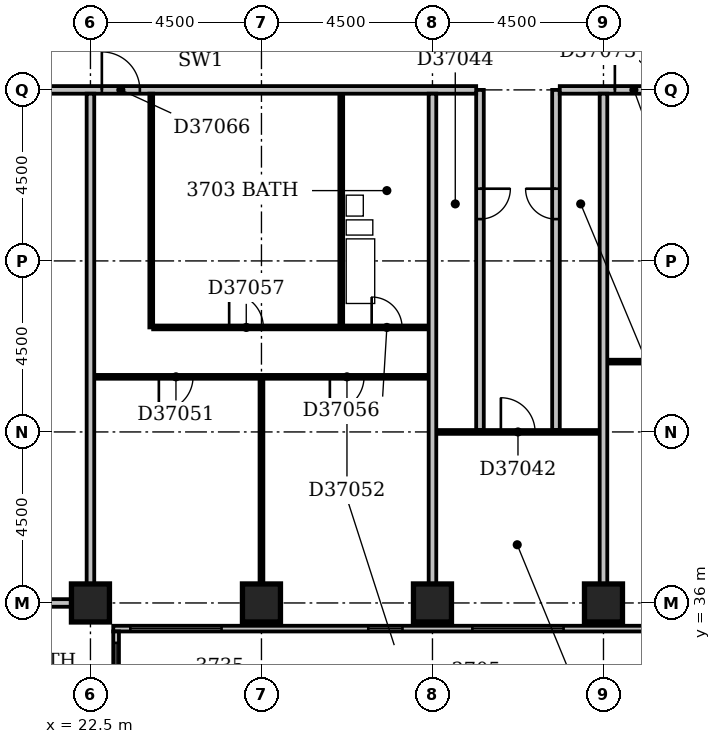
"""IFC4 building model, lengths in metres.
Left out: names, types, materials, properties, quantities, classifications, styles, units other than length and angle.
Written with IfcOpenShell. Run it as: python <this file> out.ifc"""

import sys

from ifc_helpers import new_model, si_unit, direction, frame, frame_2d, origin, origin_2d, place, context, subcontext, project, spatial, rectangle, extrude, element, fill, save


model = new_model("IFC4")
c1 = context("Model", 3, precision=1e-05, world=origin(), true_north=direction((0.0, 1.0)))
c2 = subcontext(c1, "Body", "Model", "MODEL_VIEW")
j1 = project(units=[si_unit("LENGTHUNIT", "METRE"), si_unit("PLANEANGLEUNIT", "RADIAN")], contexts=[c1])
p1 = place(None, origin())
s1 = spatial("IfcSite", under=j1, at=p1, CompositionType="ELEMENT")
p2 = place(p1, origin())
s2 = spatial("IfcBuilding", under=s1, at=p2, CompositionType="ELEMENT")
p3 = place(p2, frame((0.0, 0.0, 148.4)))
s3 = spatial("IfcBuildingStorey", under=s2, at=p3, CompositionType="ELEMENT", Elevation=148.4)
for number, where, z_axis, x_axis in (
    (1, (22.5, 36.0, -0.3), (0.0, 0.0, 1.0), (1.0, 0.0, 0.0)),
    (2, (27.0, 36.0, -0.3), (0.0, 0.0, 1.0), (1.0, 0.0, 0.0)),
    (3, (31.5, 36.0, -0.3), (0.0, 0.0, 1.0), (1.0, 0.0, 0.0)),
    (4, (36.0, 36.0, -0.3), (0.0, 0.0, 1.0), (1.0, 0.0, 0.0)),
):
    element("IfcColumn", number, at=place(p3, frame(where, z_axis=z_axis, x_axis=x_axis)), inside=s3, PredefinedType="COLUMN", context=c2, shape_type="SweptSolid", body=[
        extrude(rectangle(XDim=1.0, YDim=1.0, at=origin_2d()), origin(), (0.0, 0.0, 1.0), 3.6),
    ])
p4 = place(p3, frame((23.175, 17.4, 0.0), z_axis=(0.0, 0.0, 1.0), x_axis=(0.0, 1.0, 0.0)))
e5 = element("IfcWall", 5, at=p4, inside=s3, PredefinedType="STANDARD", context=c2, shape_type="SweptSolid", body=[
    extrude(rectangle(XDim=17.85, YDim=0.15, at=frame_2d((8.925, 0.0))), origin(), (0.0, 0.0, 1.0), 2.7),
])
p5 = place(p4, frame((1.65, 0.0, 0.6)))
e6 = element("IfcOpeningElement", 6, at=p5, cuts=e5, PredefinedType="OPENING", context=c2, shape_type="SweptSolid", body=[
    extrude(rectangle(XDim=2.4, YDim=1.8, at=frame_2d((1.2, 0.9))), frame((0.0, 0.087, 0.0), z_axis=(0.0, -1.0, 0.0), x_axis=(1.0, 0.0, 0.0)), (0.0, 0.0, 1.0), 0.174),
])
p6 = place(p4, frame((5.848, 0.0, 0.6)))
e7 = element("IfcOpeningElement", 7, at=p6, cuts=e5, PredefinedType="OPENING", context=c2, shape_type="SweptSolid", body=[
    extrude(rectangle(XDim=0.9, YDim=1.8, at=frame_2d((0.45, 0.9))), frame((0.0, 0.087, 0.0), z_axis=(0.0, -1.0, 0.0), x_axis=(1.0, 0.0, 0.0)), (0.0, 0.0, 1.0), 0.174),
])
p7 = place(p4, frame((10.65, 0.0, 0.6)))
e8 = element("IfcOpeningElement", 8, at=p7, cuts=e5, PredefinedType="OPENING", context=c2, shape_type="SweptSolid", body=[
    extrude(rectangle(XDim=2.4, YDim=1.8, at=frame_2d((1.2, 0.9))), frame((0.0, 0.087, 0.0), z_axis=(0.0, -1.0, 0.0), x_axis=(1.0, 0.0, 0.0)), (0.0, 0.0, 1.0), 0.174),
])
p8 = place(p4, frame((15.15, 0.0, 0.6)))
e9 = element("IfcOpeningElement", 9, at=p8, cuts=e5, PredefinedType="OPENING", context=c2, shape_type="SweptSolid", body=[
    extrude(rectangle(XDim=2.4, YDim=1.8, at=frame_2d((1.2, 0.9))), frame((0.0, 0.087, 0.0), z_axis=(0.0, -1.0, 0.0), x_axis=(1.0, 0.0, 0.0)), (0.0, 0.0, 1.0), 0.174),
])
p9 = place(p3, frame((23.1, 35.325, 0.0), z_axis=(0.0, 0.0, 1.0), x_axis=(1.0, 0.0, 0.0)))
e10 = element("IfcWall", 10, at=p9, inside=s3, PredefinedType="STANDARD", context=c2, shape_type="SweptSolid", body=[
    extrude(rectangle(XDim=45.15, YDim=0.15, at=frame_2d((22.575, 0.0))), origin(), (0.0, 0.0, 1.0), 2.7),
])
p10 = place(p9, frame((0.45, 0.0, 0.6)))
e11 = element("IfcOpeningElement", 11, at=p10, cuts=e10, PredefinedType="OPENING", context=c2, shape_type="SweptSolid", body=[
    extrude(rectangle(XDim=2.4, YDim=1.8, at=frame_2d((1.2, 0.9))), frame((0.0, 0.087, 0.0), z_axis=(0.0, -1.0, 0.0), x_axis=(1.0, 0.0, 0.0)), (0.0, 0.0, 1.0), 0.174),
])
p11 = place(p9, frame((6.711, 0.0, 0.6)))
e12 = element("IfcOpeningElement", 12, at=p11, cuts=e10, PredefinedType="OPENING", context=c2, shape_type="SweptSolid", body=[
    extrude(rectangle(XDim=0.9, YDim=1.8, at=frame_2d((0.45, 0.9))), frame((0.0, 0.087, 0.0), z_axis=(0.0, -1.0, 0.0), x_axis=(1.0, 0.0, 0.0)), (0.0, 0.0, 1.0), 0.174),
])
p12 = place(p9, frame((9.45, 0.0, 0.6)))
e13 = element("IfcOpeningElement", 13, at=p12, cuts=e10, PredefinedType="OPENING", context=c2, shape_type="SweptSolid", body=[
    extrude(rectangle(XDim=2.4, YDim=1.8, at=frame_2d((1.2, 0.9))), frame((0.0, 0.087, 0.0), z_axis=(0.0, -1.0, 0.0), x_axis=(1.0, 0.0, 0.0)), (0.0, 0.0, 1.0), 0.174),
])
p13 = place(p9, frame((13.95, 0.0, 0.6)))
e14 = element("IfcOpeningElement", 14, at=p13, cuts=e10, PredefinedType="OPENING", context=c2, shape_type="SweptSolid", body=[
    extrude(rectangle(XDim=2.4, YDim=1.8, at=frame_2d((1.2, 0.9))), frame((0.0, 0.087, 0.0), z_axis=(0.0, -1.0, 0.0), x_axis=(1.0, 0.0, 0.0)), (0.0, 0.0, 1.0), 0.174),
])
p14 = place(p9, frame((18.153, 0.0, 0.6)))
e15 = element("IfcOpeningElement", 15, at=p14, cuts=e10, PredefinedType="OPENING", context=c2, shape_type="SweptSolid", body=[
    extrude(rectangle(XDim=1.5, YDim=1.8, at=frame_2d((0.75, 0.9))), frame((0.0, 0.087, 0.0), z_axis=(0.0, -1.0, 0.0), x_axis=(1.0, 0.0, 0.0)), (0.0, 0.0, 1.0), 0.174),
])
p15 = place(p9, frame((22.95, 0.0, 0.6)))
e16 = element("IfcOpeningElement", 16, at=p15, cuts=e10, PredefinedType="OPENING", context=c2, shape_type="SweptSolid", body=[
    extrude(rectangle(XDim=2.4, YDim=1.8, at=frame_2d((1.2, 0.9))), frame((0.0, 0.087, 0.0), z_axis=(0.0, -1.0, 0.0), x_axis=(1.0, 0.0, 0.0)), (0.0, 0.0, 1.0), 0.174),
])
p16 = place(p9, frame((27.45, 0.0, 0.6)))
e17 = element("IfcOpeningElement", 17, at=p16, cuts=e10, PredefinedType="OPENING", context=c2, shape_type="SweptSolid", body=[
    extrude(rectangle(XDim=2.4, YDim=1.8, at=frame_2d((1.2, 0.9))), frame((0.0, 0.087, 0.0), z_axis=(0.0, -1.0, 0.0), x_axis=(1.0, 0.0, 0.0)), (0.0, 0.0, 1.0), 0.174),
])
p17 = place(p9, frame((31.689, 0.0, 0.6)))
e18 = element("IfcOpeningElement", 18, at=p17, cuts=e10, PredefinedType="OPENING", context=c2, shape_type="SweptSolid", body=[
    extrude(rectangle(XDim=1.2, YDim=1.8, at=frame_2d((0.6, 0.9))), frame((0.0, 0.087, 0.0), z_axis=(0.0, -1.0, 0.0), x_axis=(1.0, 0.0, 0.0)), (0.0, 0.0, 1.0), 0.174),
])
p18 = place(p9, frame((36.45, 0.0, 0.6)))
e19 = element("IfcOpeningElement", 19, at=p18, cuts=e10, PredefinedType="OPENING", context=c2, shape_type="SweptSolid", body=[
    extrude(rectangle(XDim=2.4, YDim=1.8, at=frame_2d((1.2, 0.9))), frame((0.0, 0.087, 0.0), z_axis=(0.0, -1.0, 0.0), x_axis=(1.0, 0.0, 0.0)), (0.0, 0.0, 1.0), 0.174),
])
p19 = place(p9, frame((40.95, 0.0, 0.6)))
e20 = element("IfcOpeningElement", 20, at=p19, cuts=e10, PredefinedType="OPENING", context=c2, shape_type="SweptSolid", body=[
    extrude(rectangle(XDim=2.4, YDim=1.8, at=frame_2d((1.2, 0.9))), frame((0.0, 0.087, 0.0), z_axis=(0.0, -1.0, 0.0), x_axis=(1.0, 0.0, 0.0)), (0.0, 0.0, 1.0), 0.174),
])
for number, where, z_axis, x_axis in (
    (21, (9.1, 36.0, 0.0), (0.0, 0.0, 1.0), (1.0, 0.0, 0.0)),
    (22, (22.5, 36.5, 0.0), (0.0, 0.0, 1.0), (0.0, 1.0, 0.0)),
):
    element("IfcWall", number, at=place(p3, frame(where, z_axis=z_axis, x_axis=x_axis)), inside=s3, PredefinedType="PARTITIONING", context=c2, shape_type="SweptSolid", body=[
        extrude(rectangle(XDim=12.9, YDim=0.2, at=frame_2d((6.45, 0.0))), origin(), (0.0, 0.0, 1.0), 3.3),
    ])
p20 = place(p3, frame((27.0, 36.5, 0.0), z_axis=(0.0, 0.0, 1.0), x_axis=(0.0, 1.0, 0.0)))
e23 = element("IfcWall", 23, at=p20, inside=s3, PredefinedType="PARTITIONING", context=c2, shape_type="SweptSolid", body=[
    extrude(rectangle(XDim=5.4, YDim=0.1, at=frame_2d((2.7, 0.0))), origin(), (0.0, 0.0, 1.0), 2.6),
])
p21 = place(p3, frame((31.5, 36.5, 0.0), z_axis=(0.0, 0.0, 1.0), x_axis=(0.0, 1.0, 0.0)))
e24 = element("IfcWall", 24, at=p21, inside=s3, PredefinedType="PARTITIONING", context=c2, shape_type="SweptSolid", body=[
    extrude(rectangle(XDim=12.9, YDim=0.2, at=frame_2d((6.45, 0.0))), origin(), (0.0, 0.0, 1.0), 3.3),
])
p22 = place(p3, frame((36.0, 36.5, 0.0), z_axis=(0.0, 0.0, 1.0), x_axis=(0.0, 1.0, 0.0)))
e25 = element("IfcWall", 25, at=p22, inside=s3, PredefinedType="PARTITIONING", context=c2, shape_type="SweptSolid", body=[
    extrude(rectangle(XDim=12.9, YDim=0.2, at=frame_2d((6.45, 0.0))), origin(), (0.0, 0.0, 1.0), 2.4),
])
p23 = place(p3, frame((31.6, 40.5, 0.0), z_axis=(0.0, 0.0, 1.0), x_axis=(1.0, 0.0, 0.0)))
e26 = element("IfcWall", 26, at=p23, inside=s3, PredefinedType="PARTITIONING", context=c2, shape_type="SweptSolid", body=[
    extrude(rectangle(XDim=4.3, YDim=0.1, at=frame_2d((2.15, 0.0))), origin(), (0.0, 0.0, 1.0), 3.3),
])
p24 = place(p23, frame((1.7, 0.0, 0.0)))
e27 = element("IfcOpeningElement", 27, at=p24, cuts=e26, PredefinedType="OPENING", context=c2, shape_type="SweptSolid", body=[
    extrude(rectangle(XDim=0.9, YDim=2.1, at=frame_2d((0.45, 1.05))), frame((0.0, 0.062, 0.0), z_axis=(0.0, -1.0, 0.0), x_axis=(1.0, 0.0, 0.0)), (0.0, 0.0, 1.0), 0.124),
])
p25 = place(p3, frame((32.75, 40.55, 0.0), z_axis=(0.0, 0.0, 1.0), x_axis=(0.0, 1.0, 0.0)))
e28 = element("IfcWall", 28, at=p25, inside=s3, PredefinedType="PARTITIONING", context=c2, shape_type="SweptSolid", body=[
    extrude(rectangle(XDim=8.95, YDim=0.2, at=frame_2d((4.475, 0.0))), origin(), (0.0, 0.0, 1.0), 3.3),
])
p26 = place(p25, frame((5.55, 0.0, 0.0)))
e29 = element("IfcOpeningElement", 29, at=p26, cuts=e28, PredefinedType="OPENING", context=c2, shape_type="SweptSolid", body=[
    extrude(rectangle(XDim=0.8, YDim=2.1, at=frame_2d((0.4, 1.05))), frame((0.0, 0.112, 0.0), z_axis=(0.0, -1.0, 0.0), x_axis=(1.0, 0.0, 0.0)), (0.0, 0.0, 1.0), 0.224),
])
p27 = place(p3, frame((34.75, 40.55, 0.0), z_axis=(0.0, 0.0, 1.0), x_axis=(0.0, 1.0, 0.0)))
e30 = element("IfcWall", 30, at=p27, inside=s3, PredefinedType="PARTITIONING", context=c2, shape_type="SweptSolid", body=[
    extrude(rectangle(XDim=8.95, YDim=0.2, at=frame_2d((4.475, 0.0))), origin(), (0.0, 0.0, 1.0), 3.3),
])
p28 = place(p27, frame((5.55, 0.0, 0.0)))
e31 = element("IfcOpeningElement", 31, at=p28, cuts=e30, PredefinedType="OPENING", context=c2, shape_type="SweptSolid", body=[
    extrude(rectangle(XDim=0.8, YDim=2.1, at=frame_2d((0.4, 1.05))), frame((0.0, 0.112, 0.0), z_axis=(0.0, -1.0, 0.0), x_axis=(1.0, 0.0, 0.0)), (0.0, 0.0, 1.0), 0.224),
])
p29 = place(p3, frame((22.6, 41.95, 0.0), z_axis=(0.0, 0.0, 1.0), x_axis=(1.0, 0.0, 0.0)))
e32 = element("IfcWall", 32, at=p29, inside=s3, PredefinedType="PARTITIONING", context=c2, shape_type="SweptSolid", body=[
    extrude(rectangle(XDim=8.8, YDim=0.1, at=frame_2d((4.4, 0.0))), origin(), (0.0, 0.0, 1.0), 3.3),
])
p30 = place(p29, frame((1.7, 0.0, 0.0)))
e33 = element("IfcOpeningElement", 33, at=p30, cuts=e32, PredefinedType="OPENING", context=c2, shape_type="SweptSolid", body=[
    extrude(rectangle(XDim=0.9, YDim=2.1, at=frame_2d((0.45, 1.05))), frame((0.0, 0.062, 0.0), z_axis=(0.0, -1.0, 0.0), x_axis=(1.0, 0.0, 0.0)), (0.0, 0.0, 1.0), 0.124),
])
p31 = place(p29, frame((6.2, 0.0, 0.0)))
e34 = element("IfcOpeningElement", 34, at=p31, cuts=e32, PredefinedType="OPENING", context=c2, shape_type="SweptSolid", body=[
    extrude(rectangle(XDim=0.9, YDim=2.1, at=frame_2d((0.45, 1.05))), frame((0.0, 0.062, 0.0), z_axis=(0.0, -1.0, 0.0), x_axis=(1.0, 0.0, 0.0)), (0.0, 0.0, 1.0), 0.124),
])
p32 = place(p3, frame((36.1, 42.35, 0.0), z_axis=(0.0, 0.0, 1.0), x_axis=(1.0, 0.0, 0.0)))
e35 = element("IfcWall", 35, at=p32, inside=s3, PredefinedType="PARTITIONING", context=c2, shape_type="SweptSolid", body=[
    extrude(rectangle(XDim=13.3, YDim=0.1, at=frame_2d((6.65, 0.0))), origin(), (0.0, 0.0, 1.0), 3.3),
])
p33 = place(p32, frame((1.7, 0.0, 0.0)))
e36 = element("IfcOpeningElement", 36, at=p33, cuts=e35, PredefinedType="OPENING", context=c2, shape_type="SweptSolid", body=[
    extrude(rectangle(XDim=0.9, YDim=2.1, at=frame_2d((0.45, 1.05))), frame((0.0, 0.062, 0.0), z_axis=(0.0, -1.0, 0.0), x_axis=(1.0, 0.0, 0.0)), (0.0, 0.0, 1.0), 0.124),
])
p34 = place(p32, frame((6.2, 0.0, 0.0)))
e37 = element("IfcOpeningElement", 37, at=p34, cuts=e35, PredefinedType="OPENING", context=c2, shape_type="SweptSolid", body=[
    extrude(rectangle(XDim=0.9, YDim=2.1, at=frame_2d((0.45, 1.05))), frame((0.0, 0.062, 0.0), z_axis=(0.0, -1.0, 0.0), x_axis=(1.0, 0.0, 0.0)), (0.0, 0.0, 1.0), 0.124),
])
p35 = place(p32, frame((10.7, 0.0, 0.0)))
e38 = element("IfcOpeningElement", 38, at=p35, cuts=e35, PredefinedType="OPENING", context=c2, shape_type="SweptSolid", body=[
    extrude(rectangle(XDim=0.9, YDim=2.1, at=frame_2d((0.45, 1.05))), frame((0.0, 0.062, 0.0), z_axis=(0.0, -1.0, 0.0), x_axis=(1.0, 0.0, 0.0)), (0.0, 0.0, 1.0), 0.124),
])
p36 = place(p3, frame((24.1, 43.25, 0.0), z_axis=(0.0, 0.0, 1.0), x_axis=(0.0, 1.0, 0.0)))
e39 = element("IfcWall", 39, at=p36, inside=s3, PredefinedType="PARTITIONING", context=c2, shape_type="SweptSolid", body=[
    extrude(rectangle(XDim=6.15, YDim=0.1, at=frame_2d((3.075, 0.0))), origin(), (0.0, 0.0, 1.0), 3.3),
])
p37 = place(p3, frame((24.15, 43.25, 0.0), z_axis=(0.0, 0.0, 1.0), x_axis=(1.0, 0.0, 0.0)))
e40 = element("IfcWall", 40, at=p37, inside=s3, PredefinedType="PARTITIONING", context=c2, shape_type="SweptSolid", body=[
    extrude(rectangle(XDim=7.25, YDim=0.1, at=frame_2d((3.625, 0.0))), origin(), (0.0, 0.0, 1.0), 3.3),
])
p38 = place(p37, frame((5.75, 0.0, 0.0)))
e41 = element("IfcOpeningElement", 41, at=p38, cuts=e40, PredefinedType="OPENING", context=c2, shape_type="SweptSolid", body=[
    extrude(rectangle(XDim=0.8, YDim=2.1, at=frame_2d((0.4, 1.05))), frame((0.0, 0.062, 0.0), z_axis=(0.0, -1.0, 0.0), x_axis=(1.0, 0.0, 0.0)), (0.0, 0.0, 1.0), 0.124),
])
p39 = place(p37, frame((2.0, 0.0, 0.0)))
e42 = element("IfcOpeningElement", 42, at=p39, cuts=e40, PredefinedType="OPENING", context=c2, shape_type="SweptSolid", body=[
    extrude(rectangle(XDim=0.9, YDim=2.1, at=frame_2d((0.45, 1.05))), frame((0.0, 0.062, 0.0), z_axis=(0.0, -1.0, 0.0), x_axis=(1.0, 0.0, 0.0)), (0.0, 0.0, 1.0), 0.124),
])
p40 = place(p3, frame((29.1, 43.3, 0.0), z_axis=(0.0, 0.0, 1.0), x_axis=(0.0, 1.0, 0.0)))
e43 = element("IfcWall", 43, at=p40, inside=s3, PredefinedType="PLUMBINGWALL", context=c2, shape_type="SweptSolid", body=[
    extrude(rectangle(XDim=6.1, YDim=0.1, at=frame_2d((3.05, 0.0))), origin(), (0.0, 0.0, 1.0), 3.3),
])
p41 = place(p3, frame((9.1, 49.5, 0.0), z_axis=(0.0, 0.0, 1.0), x_axis=(1.0, 0.0, 0.0)))
e44 = element("IfcWall", 44, at=p41, inside=s3, PredefinedType="PARTITIONING", context=c2, shape_type="SweptSolid", body=[
    extrude(rectangle(XDim=23.55, YDim=0.2, at=frame_2d((11.775, 0.0))), origin(), (0.0, 0.0, 1.0), 3.3),
])
p42 = place(p41, frame((13.7, 0.0, 0.0)))
e45 = element("IfcOpeningElement", 45, at=p42, cuts=e44, PredefinedType="OPENING", context=c2, shape_type="SweptSolid", body=[
    extrude(rectangle(XDim=1.0, YDim=2.1, at=frame_2d((0.5, 1.05))), frame((0.0, 0.112, 0.0), z_axis=(0.0, -1.0, 0.0), x_axis=(1.0, 0.0, 0.0)), (0.0, 0.0, 1.0), 0.224),
])
p43 = place(p41, frame((10.65, 0.0, 0.0)))
e46 = element("IfcOpeningElement", 46, at=p43, cuts=e44, PredefinedType="OPENING", context=c2, shape_type="SweptSolid", body=[
    extrude(rectangle(XDim=0.9, YDim=2.1, at=frame_2d((0.45, 1.05))), frame((0.0, 0.112, 0.0), z_axis=(0.0, -1.0, 0.0), x_axis=(1.0, 0.0, 0.0)), (0.0, 0.0, 1.0), 0.224),
])
p44 = place(p3, frame((34.85, 49.5, 0.0), z_axis=(0.0, 0.0, 1.0), x_axis=(1.0, 0.0, 0.0)))
e47 = element("IfcWall", 47, at=p44, inside=s3, PredefinedType="PARTITIONING", context=c2, shape_type="SweptSolid", body=[
    extrude(rectangle(XDim=15.8, YDim=0.2, at=frame_2d((7.9, 0.0))), origin(), (0.0, 0.0, 1.0), 3.3),
])
p45 = place(p44, frame((1.45, 0.0, 0.0)))
e48 = element("IfcOpeningElement", 48, at=p45, cuts=e47, PredefinedType="OPENING", context=c2, shape_type="SweptSolid", body=[
    extrude(rectangle(XDim=1.0, YDim=2.1, at=frame_2d((0.5, 1.05))), frame((0.0, 0.112, 0.0), z_axis=(0.0, -1.0, 0.0), x_axis=(1.0, 0.0, 0.0)), (0.0, 0.0, 1.0), 0.224),
])
p46 = place(p8, origin())
e49 = element("IfcWindow", 49, at=p46, inside=s3, PartitioningType="SINGLE_PANEL", PredefinedType="WINDOW", context=c2, shape_type="SweptSolid", body=[
    extrude(rectangle(XDim=2.4, YDim=1.8, at=frame_2d((1.2, 0.9))), frame((0.0, 0.03, 0.0), z_axis=(0.0, -1.0, 0.0), x_axis=(1.0, 0.0, 0.0)), (0.0, 0.0, 1.0), 0.06),
])
fill(e9, e49)
p47 = place(p10, origin())
e50 = element("IfcWindow", 50, at=p47, inside=s3, PartitioningType="SINGLE_PANEL", PredefinedType="WINDOW", context=c2, shape_type="SweptSolid", body=[
    extrude(rectangle(XDim=2.4, YDim=1.8, at=frame_2d((1.2, 0.9))), frame((0.0, 0.03, 0.0), z_axis=(0.0, -1.0, 0.0), x_axis=(1.0, 0.0, 0.0)), (0.0, 0.0, 1.0), 0.06),
])
fill(e11, e50)
p48 = place(p11, origin())
e51 = element("IfcWindow", 51, at=p48, inside=s3, PartitioningType="SINGLE_PANEL", PredefinedType="WINDOW", context=c2, shape_type="SweptSolid", body=[
    extrude(rectangle(XDim=0.9, YDim=1.8, at=frame_2d((0.45, 0.9))), frame((0.0, 0.03, 0.0), z_axis=(0.0, -1.0, 0.0), x_axis=(1.0, 0.0, 0.0)), (0.0, 0.0, 1.0), 0.06),
])
fill(e12, e51)
p49 = place(p12, origin())
e52 = element("IfcWindow", 52, at=p49, inside=s3, PartitioningType="SINGLE_PANEL", PredefinedType="WINDOW", context=c2, shape_type="SweptSolid", body=[
    extrude(rectangle(XDim=2.4, YDim=1.8, at=frame_2d((1.2, 0.9))), frame((0.0, 0.03, 0.0), z_axis=(0.0, -1.0, 0.0), x_axis=(1.0, 0.0, 0.0)), (0.0, 0.0, 1.0), 0.06),
])
fill(e13, e52)
p50 = place(p24, origin())
e53 = element("IfcDoor", 53, at=p50, inside=s3, OperationType="SINGLE_SWING_LEFT", PredefinedType="DOOR", context=c2, shape_type="SweptSolid", body=[
    extrude(rectangle(XDim=0.9, YDim=2.1, at=frame_2d((0.45, 1.05))), frame((0.0, 0.025, 0.0), z_axis=(0.0, -1.0, 0.0), x_axis=(1.0, 0.0, 0.0)), (0.0, 0.0, 1.0), 0.05),
])
fill(e27, e53)
p51 = place(p26, origin())
e54 = element("IfcDoor", 54, at=p51, inside=s3, OperationType="SINGLE_SWING_RIGHT", PredefinedType="DOOR", context=c2, shape_type="SweptSolid", body=[
    extrude(rectangle(XDim=0.8, YDim=2.1, at=frame_2d((0.4, 1.05))), frame((0.0, 0.025, 0.0), z_axis=(0.0, -1.0, 0.0), x_axis=(1.0, 0.0, 0.0)), (0.0, 0.0, 1.0), 0.05),
])
fill(e29, e54)
p52 = place(p28, frame((0.8, 0.0, 0.0), z_axis=(0.0, 0.0, 1.0), x_axis=(-1.0, 0.0, 0.0)))
e55 = element("IfcDoor", 55, at=p52, inside=s3, OperationType="SINGLE_SWING_LEFT", PredefinedType="DOOR", context=c2, shape_type="SweptSolid", body=[
    extrude(rectangle(XDim=0.8, YDim=2.1, at=frame_2d((0.4, 1.05))), frame((0.0, 0.025, 0.0), z_axis=(0.0, -1.0, 0.0), x_axis=(1.0, 0.0, 0.0)), (0.0, 0.0, 1.0), 0.05),
])
fill(e31, e55)
p53 = place(p30, frame((0.9, 0.0, 0.0), z_axis=(0.0, 0.0, 1.0), x_axis=(-1.0, 0.0, 0.0)))
e56 = element("IfcDoor", 56, at=p53, inside=s3, OperationType="SINGLE_SWING_RIGHT", PredefinedType="DOOR", context=c2, shape_type="SweptSolid", body=[
    extrude(rectangle(XDim=0.9, YDim=2.1, at=frame_2d((0.45, 1.05))), frame((0.0, 0.025, 0.0), z_axis=(0.0, -1.0, 0.0), x_axis=(1.0, 0.0, 0.0)), (0.0, 0.0, 1.0), 0.05),
])
fill(e33, e56)
p54 = place(p31, frame((0.9, 0.0, 0.0), z_axis=(0.0, 0.0, 1.0), x_axis=(-1.0, 0.0, 0.0)))
e57 = element("IfcDoor", 57, at=p54, inside=s3, OperationType="SINGLE_SWING_RIGHT", PredefinedType="DOOR", context=c2, shape_type="SweptSolid", body=[
    extrude(rectangle(XDim=0.9, YDim=2.1, at=frame_2d((0.45, 1.05))), frame((0.0, 0.025, 0.0), z_axis=(0.0, -1.0, 0.0), x_axis=(1.0, 0.0, 0.0)), (0.0, 0.0, 1.0), 0.05),
])
fill(e34, e57)
p55 = place(p38, origin())
e58 = element("IfcDoor", 58, at=p55, inside=s3, OperationType="SINGLE_SWING_LEFT", PredefinedType="DOOR", context=c2, shape_type="SweptSolid", body=[
    extrude(rectangle(XDim=0.8, YDim=2.1, at=frame_2d((0.4, 1.05))), frame((0.0, 0.025, 0.0), z_axis=(0.0, -1.0, 0.0), x_axis=(1.0, 0.0, 0.0)), (0.0, 0.0, 1.0), 0.05),
])
fill(e41, e58)
p56 = place(p39, origin())
e59 = element("IfcDoor", 59, at=p56, inside=s3, OperationType="SINGLE_SWING_LEFT", PredefinedType="DOOR", context=c2, shape_type="SweptSolid", body=[
    extrude(rectangle(XDim=0.9, YDim=2.1, at=frame_2d((0.45, 1.05))), frame((0.0, 0.025, 0.0), z_axis=(0.0, -1.0, 0.0), x_axis=(1.0, 0.0, 0.0)), (0.0, 0.0, 1.0), 0.05),
])
fill(e42, e59)
p57 = place(p42, origin())
e60 = element("IfcDoor", 60, at=p57, inside=s3, OperationType="SINGLE_SWING_LEFT", PredefinedType="DOOR", context=c2, shape_type="SweptSolid", body=[
    extrude(rectangle(XDim=1.0, YDim=2.1, at=frame_2d((0.5, 1.05))), frame((0.0, 0.025, 0.0), z_axis=(0.0, -1.0, 0.0), x_axis=(1.0, 0.0, 0.0)), (0.0, 0.0, 1.0), 0.05),
])
fill(e45, e60)
p58 = place(p45, origin())
e61 = element("IfcDoor", 61, at=p58, inside=s3, OperationType="SINGLE_SWING_LEFT", PredefinedType="DOOR", context=c2, shape_type="SweptSolid", body=[
    extrude(rectangle(XDim=1.0, YDim=2.1, at=frame_2d((0.5, 1.05))), frame((0.0, 0.025, 0.0), z_axis=(0.0, -1.0, 0.0), x_axis=(1.0, 0.0, 0.0)), (0.0, 0.0, 1.0), 0.05),
])
fill(e48, e61)
save(model, sys.argv[1])
